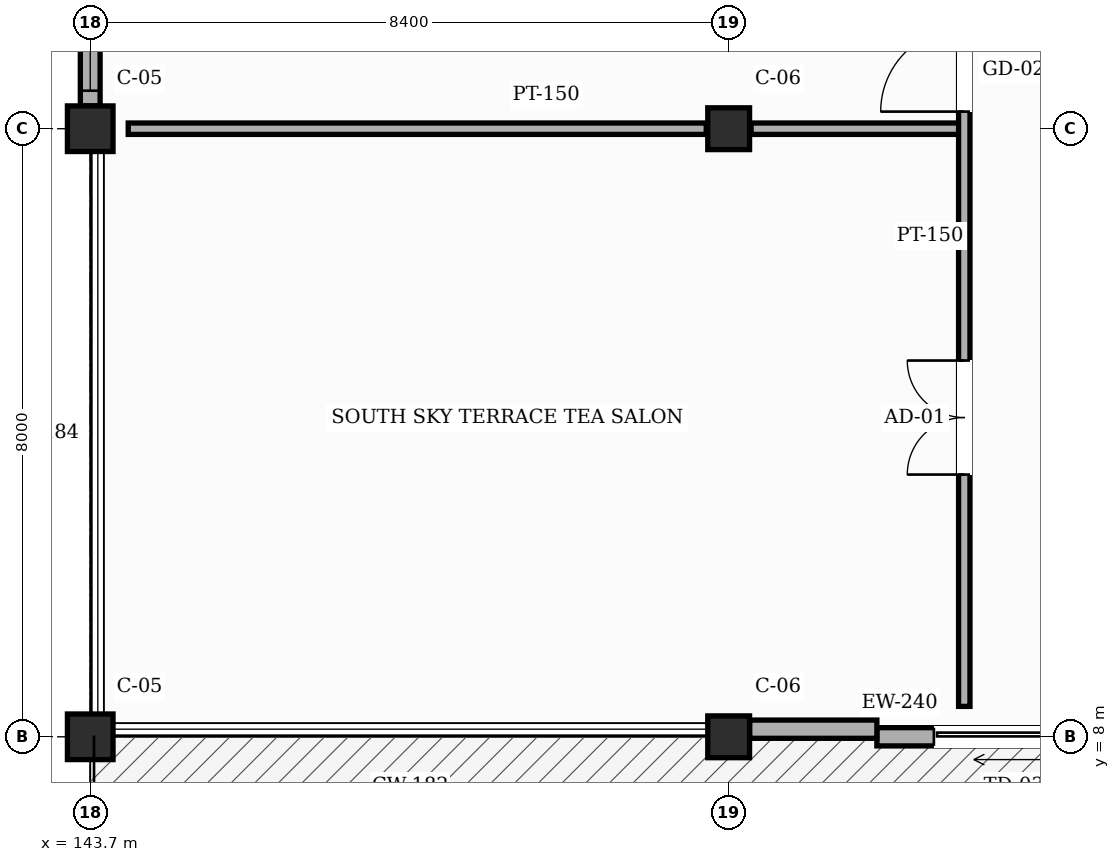
"""IFC4 building model, lengths in metres.
Left out: names, types, materials, properties, quantities, classifications, styles, units other than length and angle.
Written with IfcOpenShell. Run it as: python <this file> out.ifc"""

import sys

from ifc_helpers import new_model, si_unit, direction, frame, frame_2d, origin, origin_2d, place, context, subcontext, project, spatial, rectangle, hollow_rectangle, extrude, element, fill, save


model = new_model("IFC4")
c1 = context("Model", 3, precision=1e-05, world=origin(), true_north=direction((0.0, 1.0)))
c2 = subcontext(c1, "Body", "Model", "MODEL_VIEW")
j1 = project(units=[si_unit("LENGTHUNIT", "METRE"), si_unit("PLANEANGLEUNIT", "RADIAN")], contexts=[c1])
p1 = place(None, origin())
s1 = spatial("IfcSite", under=j1, at=p1, CompositionType="ELEMENT")
p2 = place(p1, origin())
s2 = spatial("IfcBuilding", under=s1, at=p2, CompositionType="ELEMENT")
p3 = place(p2, frame((0.0, 0.0, 31.8)))
s3 = spatial("IfcBuildingStorey", under=s2, at=p3, CompositionType="ELEMENT", Elevation=31.8)
for number, where, z_axis, x_axis in (
    (1, (143.7, 8.0, 0.0), (0.0, 0.0, 1.0), (1.0, 0.0, 0.0)),
    (2, (143.7, 16.0, 0.0), (0.0, 0.0, 1.0), (1.0, 0.0, 0.0)),
):
    element("IfcColumn", number, at=place(p3, frame(where, z_axis=z_axis, x_axis=x_axis)), inside=s3, PredefinedType="COLUMN", context=c2, shape_type="SweptSolid", body=[
        extrude(hollow_rectangle(XDim=0.6, YDim=0.6, WallThickness=0.025, InnerFilletRadius=0.025, OuterFilletRadius=0.05, at=origin_2d()), origin(), (0.0, 0.0, 1.0), 3.6),
    ])
for number, where, z_axis, x_axis in (
    (3, (152.1, 8.0, 0.0), (0.0, 0.0, 1.0), (1.0, 0.0, 0.0)),
    (4, (152.1, 16.0, 0.0), (0.0, 0.0, 1.0), (1.0, 0.0, 0.0)),
):
    element("IfcColumn", number, at=place(p3, frame(where, z_axis=z_axis, x_axis=x_axis)), inside=s3, PredefinedType="COLUMN", context=c2, shape_type="SweptSolid", body=[
        extrude(hollow_rectangle(XDim=0.55, YDim=0.55, WallThickness=0.022, InnerFilletRadius=0.022, OuterFilletRadius=0.044, at=origin_2d()), origin(), (0.0, 0.0, 1.0), 3.6),
    ])
p4 = place(p3, frame((143.7, 16.3, 0.0), z_axis=(0.0, 0.0, 1.0), x_axis=(0.0, 1.0, 0.0)))
e5 = element("IfcWall", 5, at=p4, inside=s3, PredefinedType="SOLIDWALL", context=c2, shape_type="SweptSolid", body=[
    extrude(rectangle(XDim=7.4, YDim=0.26, at=frame_2d((3.7, 0.0))), origin(), (0.0, 0.0, 1.0), 2.805),
])
p5 = place(p4, frame((0.2, 0.0, 0.85)))
e6 = element("IfcOpeningElement", 6, at=p5, cuts=e5, PredefinedType="OPENING", context=c2, shape_type="SweptSolid", body=[
    extrude(rectangle(XDim=1.95, YDim=1.65, at=frame_2d((0.975, 0.825))), frame((0.0, 0.14, 0.0), z_axis=(0.0, -1.0, 0.0), x_axis=(1.0, 0.0, 0.0)), (0.0, 0.0, 1.0), 0.28),
])
p6 = place(p4, frame((2.55, 0.0, 0.85)))
e7 = element("IfcOpeningElement", 7, at=p6, cuts=e5, PredefinedType="OPENING", context=c2, shape_type="SweptSolid", body=[
    extrude(rectangle(XDim=2.25, YDim=1.65, at=frame_2d((1.125, 0.825))), frame((0.0, 0.14, 0.0), z_axis=(0.0, -1.0, 0.0), x_axis=(1.0, 0.0, 0.0)), (0.0, 0.0, 1.0), 0.28),
])
p7 = place(p4, frame((5.525, 0.0, 0.85)))
e8 = element("IfcOpeningElement", 8, at=p7, cuts=e5, PredefinedType="OPENING", context=c2, shape_type="SweptSolid", body=[
    extrude(rectangle(XDim=1.35, YDim=1.35, at=frame_2d((0.675, 0.675))), frame((0.0, 0.14, 0.0), z_axis=(0.0, -1.0, 0.0), x_axis=(1.0, 0.0, 0.0)), (0.0, 0.0, 1.0), 0.28),
])
p8 = place(p3, frame((154.05, 8.0, 0.0), z_axis=(0.0, 0.0, 1.0), x_axis=(1.0, 0.0, 0.0)))
e9 = element("IfcWall", 9, at=p8, inside=s3, PredefinedType="SOLIDWALL", context=c2, shape_type="SweptSolid", body=[
    extrude(rectangle(XDim=3.6, YDim=0.24, at=frame_2d((1.8, 0.0))), origin(), (0.0, 0.0, 1.0), 2.755),
])
p9 = place(p8, frame((0.75, 0.0, 0.0)))
e10 = element("IfcOpeningElement", 10, at=p9, cuts=e9, PredefinedType="OPENING", context=c2, shape_type="SweptSolid", body=[
    extrude(rectangle(XDim=2.1, YDim=2.4, at=frame_2d((1.05, 1.2))), frame((0.0, 0.13, 0.0), z_axis=(0.0, -1.0, 0.0), x_axis=(1.0, 0.0, 0.0)), (0.0, 0.0, 1.0), 0.26),
])
p10 = place(p3, frame((154.05, 8.1, 0.0), z_axis=(0.0, 0.0, 1.0), x_axis=(-1.0, 0.0, 0.0)))
e11 = element("IfcWall", 11, at=p10, inside=s3, PredefinedType="SOLIDWALL", context=c2, shape_type="SweptSolid", body=[
    extrude(rectangle(XDim=1.675, YDim=0.24, at=frame_2d((0.837, 0.0))), origin(), (0.0, 0.0, 1.0), 2.755),
])
p11 = place(p3, frame((144.2, 16.0, 0.0), z_axis=(0.0, 0.0, 1.0), x_axis=(1.0, 0.0, 0.0)))
e12 = element("IfcWall", 12, at=p11, inside=s3, PredefinedType="PARTITIONING", context=c2, shape_type="SweptSolid", body=[
    extrude(rectangle(XDim=7.605, YDim=0.15, at=frame_2d((3.802, 0.0))), origin(), (0.0, 0.0, 1.0), 2.755),
])
p12 = place(p3, frame((152.395, 16.0, 0.0), z_axis=(0.0, 0.0, 1.0), x_axis=(1.0, 0.0, 0.0)))
e13 = element("IfcWall", 13, at=p12, inside=s3, PredefinedType="PARTITIONING", context=c2, shape_type="SweptSolid", body=[
    extrude(rectangle(XDim=2.805, YDim=0.15, at=frame_2d((1.402, 0.0))), origin(), (0.0, 0.0, 1.0), 2.755),
])
p13 = place(p3, frame((155.2, 8.4, 0.0), z_axis=(0.0, 0.0, 1.0), x_axis=(0.0, 1.0, 0.0)))
e14 = element("IfcWall", 14, at=p13, inside=s3, PredefinedType="PARTITIONING", context=c2, shape_type="SweptSolid", body=[
    extrude(rectangle(XDim=18.2, YDim=0.15, at=frame_2d((9.1, 0.0))), origin(), (0.0, 0.0, 1.0), 3.365),
])
p14 = place(p13, frame((3.05, 0.0, 0.0)))
e15 = element("IfcOpeningElement", 15, at=p14, cuts=e14, PredefinedType="OPENING", context=c2, shape_type="SweptSolid", body=[
    extrude(rectangle(XDim=1.5, YDim=2.3, at=frame_2d((0.75, 1.15))), frame((0.0, 0.085, 0.0), z_axis=(0.0, -1.0, 0.0), x_axis=(1.0, 0.0, 0.0)), (0.0, 0.0, 1.0), 0.17),
])
p15 = place(p13, frame((7.825, 0.0, 0.0)))
e16 = element("IfcOpeningElement", 16, at=p15, cuts=e14, PredefinedType="OPENING", context=c2, shape_type="SweptSolid", body=[
    extrude(rectangle(XDim=1.1, YDim=2.2, at=frame_2d((0.55, 1.1))), frame((0.0, 0.085, 0.0), z_axis=(0.0, -1.0, 0.0), x_axis=(1.0, 0.0, 0.0)), (0.0, 0.0, 1.0), 0.17),
])
p16 = place(p13, frame((10.55, 0.0, 0.0)))
e17 = element("IfcOpeningElement", 17, at=p16, cuts=e14, PredefinedType="OPENING", context=c2, shape_type="SweptSolid", body=[
    extrude(rectangle(XDim=0.95, YDim=2.15, at=frame_2d((0.475, 1.075))), frame((0.0, 0.085, 0.0), z_axis=(0.0, -1.0, 0.0), x_axis=(1.0, 0.0, 0.0)), (0.0, 0.0, 1.0), 0.17),
])
p17 = place(p13, frame((13.2, 0.0, 0.0)))
e18 = element("IfcOpeningElement", 18, at=p17, cuts=e14, PredefinedType="OPENING", context=c2, shape_type="SweptSolid", body=[
    extrude(rectangle(XDim=0.95, YDim=2.15, at=frame_2d((0.475, 1.075))), frame((0.0, 0.085, 0.0), z_axis=(0.0, -1.0, 0.0), x_axis=(1.0, 0.0, 0.0)), (0.0, 0.0, 1.0), 0.17),
])
p18 = place(p13, frame((15.85, 0.0, 0.0)))
e19 = element("IfcOpeningElement", 19, at=p18, cuts=e14, PredefinedType="OPENING", context=c2, shape_type="SweptSolid", body=[
    extrude(rectangle(XDim=0.95, YDim=2.15, at=frame_2d((0.475, 1.075))), frame((0.0, 0.085, 0.0), z_axis=(0.0, -1.0, 0.0), x_axis=(1.0, 0.0, 0.0)), (0.0, 0.0, 1.0), 0.17),
])
p19 = place(p5, origin())
e20 = element("IfcWindow", 20, at=p19, inside=s3, PartitioningType="SINGLE_PANEL", PredefinedType="WINDOW", context=c2, shape_type="SweptSolid", body=[
    extrude(rectangle(XDim=1.95, YDim=1.65, at=frame_2d((0.975, 0.825))), frame((0.0, 0.03, 0.0), z_axis=(0.0, -1.0, 0.0), x_axis=(1.0, 0.0, 0.0)), (0.0, 0.0, 1.0), 0.06),
])
fill(e6, e20)
p20 = place(p9, origin())
e21 = element("IfcDoor", 21, at=p20, inside=s3, OperationType="SLIDING_TO_LEFT", PredefinedType="DOOR", context=c2, shape_type="SweptSolid", body=[
    extrude(rectangle(XDim=2.1, YDim=2.4, at=frame_2d((1.05, 1.2))), frame((0.0, 0.025, 0.0), z_axis=(0.0, -1.0, 0.0), x_axis=(1.0, 0.0, 0.0)), (0.0, 0.0, 1.0), 0.05),
])
fill(e10, e21)
p21 = place(p14, origin())
e22 = element("IfcDoor", 22, at=p21, inside=s3, OperationType="DOUBLE_DOOR_SINGLE_SWING", PredefinedType="DOOR", context=c2, shape_type="SweptSolid", body=[
    extrude(rectangle(XDim=1.5, YDim=2.3, at=frame_2d((0.75, 1.15))), frame((0.0, 0.025, 0.0), z_axis=(0.0, -1.0, 0.0), x_axis=(1.0, 0.0, 0.0)), (0.0, 0.0, 1.0), 0.05),
])
fill(e15, e22)
p22 = place(p15, origin())
e23 = element("IfcDoor", 23, at=p22, inside=s3, OperationType="SINGLE_SWING_LEFT", PredefinedType="DOOR", context=c2, shape_type="SweptSolid", body=[
    extrude(rectangle(XDim=1.1, YDim=2.2, at=frame_2d((0.55, 1.1))), frame((0.0, 0.025, 0.0), z_axis=(0.0, -1.0, 0.0), x_axis=(1.0, 0.0, 0.0)), (0.0, 0.0, 1.0), 0.05),
])
fill(e16, e23)
save(model, sys.argv[1])
